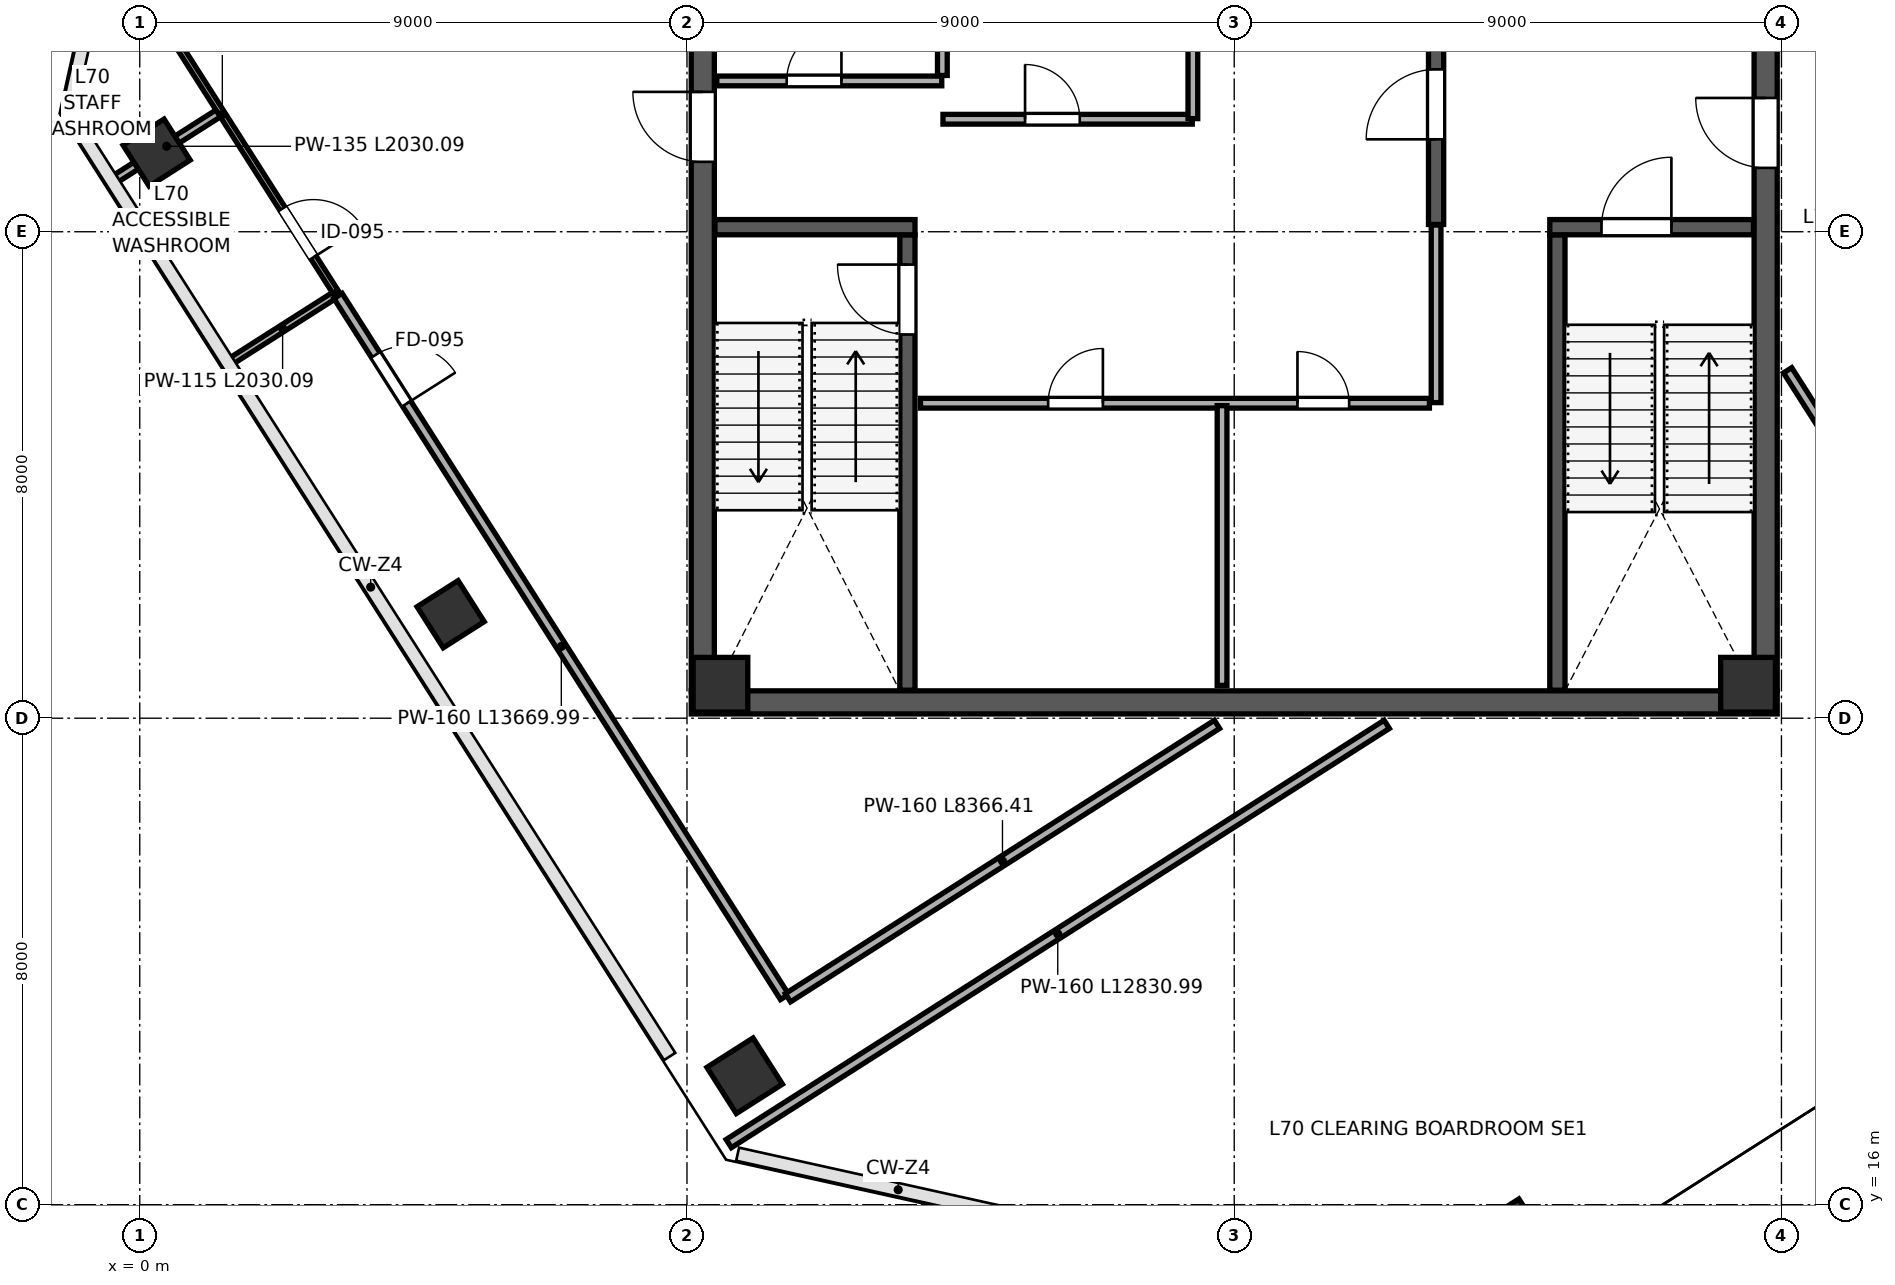
"""IFC4 building model, lengths in metres.
Left out: names, types, materials, properties, quantities, classifications, styles, units other than length and angle.
Written with IfcOpenShell. Run it as: python <this file> out.ifc"""

import sys

from ifc_helpers import new_model, si_unit, direction, frame, frame_2d, origin, origin_2d, place, context, subcontext, project, spatial, rectangle, extrude, source, transform, mapped, element, fill, save


model = new_model("IFC4")
c1 = context("Model", 3, precision=1e-05, world=origin(), true_north=direction((0.0, 1.0)))
c2 = subcontext(c1, "Body", "Model", "MODEL_VIEW")
j1 = project(units=[si_unit("LENGTHUNIT", "METRE"), si_unit("PLANEANGLEUNIT", "RADIAN")], contexts=[c1])
p1 = place(None, origin())
s1 = spatial("IfcSite", under=j1, at=p1, CompositionType="ELEMENT")
p2 = place(p1, origin())
s2 = spatial("IfcBuilding", under=s1, at=p2, CompositionType="ELEMENT")
p3 = place(p2, frame((0.0, 0.0, 311.4)))
s3 = spatial("IfcBuildingStorey", under=s2, at=p3, CompositionType="ELEMENT", Elevation=311.4)
m1 = source(origin(), c2, "Body", "SweptSolid", [
    extrude(rectangle(XDim=0.9, YDim=0.9, at=origin_2d()), origin(), (0.0, 0.0, 1.0), 4.199),
])
for number, where, z_axis, x_axis in (
    (1, (9.55, 24.55, 0.001), (0.0, 0.0, 1.0), (1.0, 0.0, 0.0)),
    (2, (26.45, 24.55, 0.001), (0.0, 0.0, 1.0), (1.0, 0.0, 0.0)),
):
    element("IfcColumn", number, at=place(p3, frame(where, z_axis=z_axis, x_axis=x_axis)), inside=s3, PredefinedType="COLUMN", context=c2, shape_type="MappedRepresentation", body=[
        mapped(m1, transform((0.0, 0.0, 0.0), scale=1.0)),
    ])
m2 = source(origin(), c2, "Body", "SweptSolid", [
    extrude(rectangle(XDim=0.8, YDim=0.8, at=origin_2d()), origin(), (0.0, 0.0, 1.0), 4.199),
])
for number, where, z_axis, x_axis in (
    (3, (0.277, 33.301, 0.001), (0.0, 0.0, 1.0), (-0.537, 0.843, 0.0)),
    (4, (5.113, 25.71, 0.001), (0.0, 0.0, 1.0), (-0.537, 0.843, 0.0)),
):
    element("IfcColumn", number, at=place(p3, frame(where, z_axis=z_axis, x_axis=x_axis)), inside=s3, PredefinedType="COLUMN", context=c2, shape_type="MappedRepresentation", body=[
        mapped(m2, transform((0.0, 0.0, 0.0), scale=1.0)),
    ])
m3 = source(origin(), c2, "Body", "SweptSolid", [
    extrude(rectangle(XDim=0.9, YDim=0.9, at=origin_2d()), origin(), (0.0, 0.0, 1.0), 4.199),
])
for number, where, z_axis, x_axis in (
    (5, (9.949, 18.12, 0.001), (0.0, 0.0, 1.0), (-0.537, 0.843, 0.0)),
    (6, (22.544, 15.472, 0.001), (0.0, 0.0, 1.0), (-0.537, 0.843, 0.0)),
):
    element("IfcColumn", number, at=place(p3, frame(where, z_axis=z_axis, x_axis=x_axis)), inside=s3, PredefinedType="COLUMN", context=c2, shape_type="MappedRepresentation", body=[
        mapped(m3, transform((0.0, 0.0, 0.0), scale=1.0)),
    ])
p4 = place(p3, frame((9.26, 24.45, 0.0), z_axis=(0.0, 0.0, 1.0), x_axis=(0.0, 1.0, 0.0)))
e7 = element("IfcWall", 7, at=p4, inside=s3, PredefinedType="SHEAR", context=c2, shape_type="SweptSolid", body=[
    extrude(rectangle(XDim=15.1, YDim=0.38, at=frame_2d((7.55, 0.0))), origin(), (0.0, 0.0, 1.0), 3.96),
])
p5 = place(p4, frame((8.7, 0.0, 0.0)))
e8 = element("IfcOpeningElement", 8, at=p5, cuts=e7, PredefinedType="OPENING", context=c2, shape_type="SweptSolid", body=[
    extrude(rectangle(XDim=1.15, YDim=2.2, at=frame_2d((0.575, 1.1))), frame((0.0, 0.2, 0.0), z_axis=(0.0, -1.0, 0.0), x_axis=(1.0, 0.0, 0.0)), (0.0, 0.0, 1.0), 0.4),
])
p6 = place(p3, frame((26.74, 24.45, 0.0), z_axis=(0.0, 0.0, 1.0), x_axis=(0.0, 1.0, 0.0)))
e9 = element("IfcWall", 9, at=p6, inside=s3, PredefinedType="SHEAR", context=c2, shape_type="SweptSolid", body=[
    extrude(rectangle(XDim=15.1, YDim=0.38, at=frame_2d((7.55, 0.0))), origin(), (0.0, 0.0, 1.0), 3.96),
])
p7 = place(p6, frame((8.6, 0.0, 0.0)))
e10 = element("IfcOpeningElement", 10, at=p7, cuts=e9, PredefinedType="OPENING", context=c2, shape_type="SweptSolid", body=[
    extrude(rectangle(XDim=1.15, YDim=2.2, at=frame_2d((0.575, 1.1))), frame((0.0, 0.2, 0.0), z_axis=(0.0, -1.0, 0.0), x_axis=(1.0, 0.0, 0.0)), (0.0, 0.0, 1.0), 0.4),
])
p8 = place(p3, frame((9.07, 24.26, 0.0), z_axis=(0.0, 0.0, 1.0), x_axis=(1.0, 0.0, 0.0)))
e11 = element("IfcWall", 11, at=p8, inside=s3, PredefinedType="SHEAR", context=c2, shape_type="SweptSolid", body=[
    extrude(rectangle(XDim=17.86, YDim=0.38, at=frame_2d((8.93, 0.0))), origin(), (0.0, 0.0, 1.0), 3.96),
])
p9 = place(p3, frame((12.625, 24.46, 0.0), z_axis=(0.0, 0.0, 1.0), x_axis=(0.0, 1.0, 0.0)))
e12 = element("IfcWall", 12, at=p9, inside=s3, PredefinedType="SHEAR", context=c2, shape_type="SweptSolid", body=[
    extrude(rectangle(XDim=7.49, YDim=0.25, at=frame_2d((3.745, 0.0))), origin(), (0.0, 0.0, 1.0), 3.96),
])
p10 = place(p9, frame((5.85, 0.0, 0.0)))
e13 = element("IfcOpeningElement", 13, at=p10, cuts=e12, PredefinedType="OPENING", context=c2, shape_type="SweptSolid", body=[
    extrude(rectangle(XDim=1.15, YDim=2.2, at=frame_2d((0.575, 1.1))), frame((0.0, 0.135, 0.0), z_axis=(0.0, -1.0, 0.0), x_axis=(1.0, 0.0, 0.0)), (0.0, 0.0, 1.0), 0.27),
])
p11 = place(p3, frame((9.46, 32.075, 0.0), z_axis=(0.0, 0.0, 1.0), x_axis=(1.0, 0.0, 0.0)))
e14 = element("IfcWall", 14, at=p11, inside=s3, PredefinedType="SHEAR", context=c2, shape_type="SweptSolid", body=[
    extrude(rectangle(XDim=3.29, YDim=0.25, at=frame_2d((1.645, 0.0))), origin(), (0.0, 0.0, 1.0), 3.96),
])
p12 = place(p3, frame((23.315, 24.46, 0.0), z_axis=(0.0, 0.0, 1.0), x_axis=(0.0, 1.0, 0.0)))
e15 = element("IfcWall", 15, at=p12, inside=s3, PredefinedType="SHEAR", context=c2, shape_type="SweptSolid", body=[
    extrude(rectangle(XDim=7.49, YDim=0.25, at=frame_2d((3.745, 0.0))), origin(), (0.0, 0.0, 1.0), 3.96),
])
p13 = place(p3, frame((23.19, 32.075, 0.0), z_axis=(0.0, 0.0, 1.0), x_axis=(1.0, 0.0, 0.0)))
e16 = element("IfcWall", 16, at=p13, inside=s3, PredefinedType="SHEAR", context=c2, shape_type="SweptSolid", body=[
    extrude(rectangle(XDim=3.35, YDim=0.25, at=frame_2d((1.675, 0.0))), origin(), (0.0, 0.0, 1.0), 3.96),
])
p14 = place(p13, frame((0.85, 0.0, 0.0)))
e17 = element("IfcOpeningElement", 17, at=p14, cuts=e16, PredefinedType="OPENING", context=c2, shape_type="SweptSolid", body=[
    extrude(rectangle(XDim=1.15, YDim=2.2, at=frame_2d((0.575, 1.1))), frame((0.0, 0.135, 0.0), z_axis=(0.0, -1.0, 0.0), x_axis=(1.0, 0.0, 0.0)), (0.0, 0.0, 1.0), 0.27),
])
p15 = place(p3, frame((21.32, 32.12, 0.0), z_axis=(0.0, 0.0, 1.0), x_axis=(0.0, 1.0, 0.0)))
e18 = element("IfcWall", 18, at=p15, inside=s3, PredefinedType="SHEAR", context=c2, shape_type="SweptSolid", body=[
    extrude(rectangle(XDim=7.42, YDim=0.25, at=frame_2d((3.71, 0.0))), origin(), (0.0, 0.0, 1.0), 3.96),
])
p16 = place(p15, frame((1.4, 0.0, 0.0)))
e19 = element("IfcOpeningElement", 19, at=p16, cuts=e18, PredefinedType="OPENING", context=c2, shape_type="SweptSolid", body=[
    extrude(rectangle(XDim=1.15, YDim=2.2, at=frame_2d((0.575, 1.1))), frame((0.0, 0.135, 0.0), z_axis=(0.0, -1.0, 0.0), x_axis=(1.0, 0.0, 0.0)), (0.0, 0.0, 1.0), 0.27),
])
p17 = place(p3, frame((9.49, 34.48, 0.0), z_axis=(0.0, 0.0, 1.0), x_axis=(1.0, 0.0, 0.0)))
e20 = element("IfcWall", 20, at=p17, inside=s3, PredefinedType="PARTITIONING", context=c2, shape_type="SweptSolid", body=[
    extrude(rectangle(XDim=3.7, YDim=0.16, at=frame_2d((1.85, 0.0))), origin(), (0.0, 0.0, 1.0), 3.96),
])
p18 = place(p17, frame((1.15, 0.0, 0.0)))
e21 = element("IfcOpeningElement", 21, at=p18, cuts=e20, PredefinedType="OPENING", context=c2, shape_type="SweptSolid", body=[
    extrude(rectangle(XDim=0.9, YDim=2.15, at=frame_2d((0.45, 1.075))), frame((0.0, 0.09, 0.0), z_axis=(0.0, -1.0, 0.0), x_axis=(1.0, 0.0, 0.0)), (0.0, 0.0, 1.0), 0.18),
])
p19 = place(p3, frame((13.2, 34.57, 0.0), z_axis=(0.0, 0.0, 1.0), x_axis=(0.0, 1.0, 0.0)))
e22 = element("IfcWall", 22, at=p19, inside=s3, PredefinedType="PARTITIONING", context=c2, shape_type="SweptSolid", body=[
    extrude(rectangle(XDim=1.57, YDim=0.16, at=frame_2d((0.785, 0.0))), origin(), (0.0, 0.0, 1.0), 3.96),
])
p20 = place(p3, frame((13.21, 33.85, 0.0), z_axis=(0.0, 0.0, 1.0), x_axis=(1.0, 0.0, 0.0)))
e23 = element("IfcWall", 23, at=p20, inside=s3, PredefinedType="PARTITIONING", context=c2, shape_type="SweptSolid", body=[
    extrude(rectangle(XDim=4.1, YDim=0.16, at=frame_2d((2.05, 0.0))), origin(), (0.0, 0.0, 1.0), 3.96),
])
p21 = place(p20, frame((1.35, 0.0, 0.0)))
e24 = element("IfcOpeningElement", 24, at=p21, cuts=e23, PredefinedType="OPENING", context=c2, shape_type="SweptSolid", body=[
    extrude(rectangle(XDim=0.9, YDim=2.15, at=frame_2d((0.45, 1.075))), frame((0.0, 0.09, 0.0), z_axis=(0.0, -1.0, 0.0), x_axis=(1.0, 0.0, 0.0)), (0.0, 0.0, 1.0), 0.18),
])
p22 = place(p3, frame((17.32, 33.86, 0.0), z_axis=(0.0, 0.0, 1.0), x_axis=(0.0, 1.0, 0.0)))
e25 = element("IfcWall", 25, at=p22, inside=s3, PredefinedType="PARTITIONING", context=c2, shape_type="SweptSolid", body=[
    extrude(rectangle(XDim=1.93, YDim=0.16, at=frame_2d((0.965, 0.0))), origin(), (0.0, 0.0, 1.0), 3.96),
])
p23 = place(p3, frame((12.84, 29.18, 0.0), z_axis=(0.0, 0.0, 1.0), x_axis=(1.0, 0.0, 0.0)))
e26 = element("IfcWall", 26, at=p23, inside=s3, PredefinedType="PARTITIONING", context=c2, shape_type="SweptSolid", body=[
    extrude(rectangle(XDim=8.37, YDim=0.16, at=frame_2d((4.185, 0.0))), origin(), (0.0, 0.0, 1.0), 3.96),
])
p24 = place(p23, frame((2.1, 0.0, 0.0)))
e27 = element("IfcOpeningElement", 27, at=p24, cuts=e26, PredefinedType="OPENING", context=c2, shape_type="SweptSolid", body=[
    extrude(rectangle(XDim=0.9, YDim=2.15, at=frame_2d((0.45, 1.075))), frame((0.0, 0.09, 0.0), z_axis=(0.0, -1.0, 0.0), x_axis=(1.0, 0.0, 0.0)), (0.0, 0.0, 1.0), 0.18),
])
p25 = place(p23, frame((6.2, 0.0, 0.0)))
e28 = element("IfcOpeningElement", 28, at=p25, cuts=e26, PredefinedType="OPENING", context=c2, shape_type="SweptSolid", body=[
    extrude(rectangle(XDim=0.85, YDim=2.1, at=frame_2d((0.425, 1.05))), frame((0.0, 0.09, 0.0), z_axis=(0.0, -1.0, 0.0), x_axis=(1.0, 0.0, 0.0)), (0.0, 0.0, 1.0), 0.18),
])
p26 = place(p3, frame((17.8, 24.54, 0.0), z_axis=(0.0, 0.0, 1.0), x_axis=(0.0, 1.0, 0.0)))
e29 = element("IfcWall", 29, at=p26, inside=s3, PredefinedType="PARTITIONING", context=c2, shape_type="SweptSolid", body=[
    extrude(rectangle(XDim=4.6, YDim=0.16, at=frame_2d((2.3, 0.0))), origin(), (0.0, 0.0, 1.0), 3.96),
])
p27 = place(p3, frame((21.32, 29.19, 0.0), z_axis=(0.0, 0.0, 1.0), x_axis=(0.0, 1.0, 0.0)))
e30 = element("IfcWall", 30, at=p27, inside=s3, PredefinedType="PARTITIONING", context=c2, shape_type="SweptSolid", body=[
    extrude(rectangle(XDim=2.92, YDim=0.16, at=frame_2d((1.46, 0.0))), origin(), (0.0, 0.0, 1.0), 3.96),
])
p28 = place(p3, frame((-0.414, 32.86, 0.0), z_axis=(0.0, 0.0, 1.0), x_axis=(0.843468317829, 0.5371789244, 0.0)))
e31 = element("IfcWall", 31, at=p28, inside=s3, PredefinedType="PARTITIONING", context=c2, shape_type="SweptSolid", body=[
    extrude(rectangle(XDim=2.03, YDim=0.135, at=frame_2d((1.015, 0.0))), origin(), (0.0, 0.0, 1.0), 3.295),
])
p29 = place(p3, frame((1.493, 29.866, 0.0), z_axis=(0.0, 0.0, 1.0), x_axis=(0.843433611632, 0.537233415537, 0.0)))
e32 = element("IfcWall", 32, at=p29, inside=s3, PredefinedType="PARTITIONING", context=c2, shape_type="SweptSolid", body=[
    extrude(rectangle(XDim=2.03, YDim=0.115, at=frame_2d((1.015, 0.0))), origin(), (0.0, 0.0, 1.0), 3.295),
])
p30 = place(p3, frame((-0.502, 36.85, 0.0), z_axis=(0.0, 0.0, 1.0), x_axis=(0.537309039539, -0.843385437407, 0.0)))
e33 = element("IfcWall", 33, at=p30, inside=s3, PredefinedType="PARTITIONING", context=c2, shape_type="SweptSolid", body=[
    extrude(rectangle(XDim=6.922, YDim=0.1, at=frame_2d((3.461, 0.0))), origin(), (0.0, 0.0, 1.0), 3.96),
])
p31 = place(p30, frame((0.8, 0.0, 0.0)))
e34 = element("IfcOpeningElement", 34, at=p31, cuts=e33, PredefinedType="OPENING", context=c2, shape_type="SweptSolid", body=[
    extrude(rectangle(XDim=0.9, YDim=2.15, at=frame_2d((0.45, 1.075))), frame((0.0, 0.06, 0.0), z_axis=(0.0, -1.0, 0.0), x_axis=(1.0, 0.0, 0.0)), (0.0, 0.0, 1.0), 0.12),
])
p32 = place(p30, frame((5.3, 0.0, 0.0)))
e35 = element("IfcOpeningElement", 35, at=p32, cuts=e33, PredefinedType="OPENING", context=c2, shape_type="SweptSolid", body=[
    extrude(rectangle(XDim=0.95, YDim=2.15, at=frame_2d((0.475, 1.075))), frame((0.0, 0.06, 0.0), z_axis=(0.0, -1.0, 0.0), x_axis=(1.0, 0.0, 0.0)), (0.0, 0.0, 1.0), 0.12),
])
p33 = place(p3, frame((3.26, 30.945, 0.0), z_axis=(0.0, 0.0, 1.0), x_axis=(0.537307625317, -0.843386338386, 0.0)))
e36 = element("IfcWall", 36, at=p33, inside=s3, PredefinedType="PARTITIONING", context=c2, shape_type="SweptSolid", body=[
    extrude(rectangle(XDim=13.67, YDim=0.16, at=frame_2d((6.835, 0.0))), origin(), (0.0, 0.0, 1.0), 3.96),
])
p34 = place(p33, frame((1.15, 0.0, 0.0)))
e37 = element("IfcOpeningElement", 37, at=p34, cuts=e36, PredefinedType="OPENING", context=c2, shape_type="SweptSolid", body=[
    extrude(rectangle(XDim=0.95, YDim=2.15, at=frame_2d((0.475, 1.075))), frame((0.0, 0.09, 0.0), z_axis=(0.0, -1.0, 0.0), x_axis=(1.0, 0.0, 0.0)), (0.0, 0.0, 1.0), 0.18),
])
p35 = place(p3, frame((10.661, 19.403, 0.0), z_axis=(0.0, 0.0, 1.0), x_axis=(0.843399441764, 0.537287057012, 0.0)))
e38 = element("IfcWall", 38, at=p35, inside=s3, PredefinedType="PARTITIONING", context=c2, shape_type="SweptSolid", body=[
    extrude(rectangle(XDim=8.366, YDim=0.16, at=frame_2d((4.183, 0.0))), origin(), (0.0, 0.0, 1.0), 3.96),
])
p36 = place(p3, frame((27.102, 29.721, 0.0), z_axis=(0.0, 0.0, 1.0), x_axis=(0.537279676557, -0.843404143432, 0.0)))
e39 = element("IfcWall", 39, at=p36, inside=s3, PredefinedType="PARTITIONING", context=c2, shape_type="SweptSolid", body=[
    extrude(rectangle(XDim=1.329, YDim=0.16, at=frame_2d((0.664, 0.0))), origin(), (0.0, 0.0, 1.0), 3.96),
])
p37 = place(p3, frame((22.509, 49.847, 0.0), z_axis=(0.0, 0.0, 1.0), x_axis=(0.537290700932, -0.843397120396, 0.0)))
e40 = element("IfcWall", 40, at=p37, inside=s3, PredefinedType="PARTITIONING", context=c2, shape_type="SweptSolid", body=[
    extrude(rectangle(XDim=20.77, YDim=0.135, at=frame_2d((10.385, 0.0))), origin(), (0.0, 0.0, 1.0), 3.96),
])
p38 = place(p37, frame((4.3, 0.0, 0.0)))
e41 = element("IfcOpeningElement", 41, at=p38, cuts=e40, PredefinedType="OPENING", context=c2, shape_type="SweptSolid", body=[
    extrude(rectangle(XDim=0.95, YDim=2.15, at=frame_2d((0.475, 1.075))), frame((0.0, 0.078, 0.0), z_axis=(0.0, -1.0, 0.0), x_axis=(1.0, 0.0, 0.0)), (0.0, 0.0, 1.0), 0.155),
])
p39 = place(p3, frame((9.687, 17.004, 0.0), z_axis=(0.0, 0.0, 1.0), x_axis=(0.843392646996, 0.537297722862, 0.0)))
e42 = element("IfcWall", 42, at=p39, inside=s3, PredefinedType="PARTITIONING", context=c2, shape_type="SweptSolid", body=[
    extrude(rectangle(XDim=12.831, YDim=0.16, at=frame_2d((6.416, 0.0))), origin(), (0.0, 0.0, 1.0), 3.96),
])
m4 = source(origin(), c2, "Body", "SweptSolid", [
    extrude(rectangle(XDim=1.15, YDim=2.2, at=frame_2d((0.575, 1.1))), frame((0.0, 0.025, 0.0), z_axis=(0.0, -1.0, 0.0), x_axis=(1.0, 0.0, 0.0)), (0.0, 0.0, 1.0), 0.05),
])
p40 = place(p10, origin())
e43 = element("IfcDoor", 43, at=p40, inside=s3, OperationType="SINGLE_SWING_RIGHT", PredefinedType="DOOR", context=c2, shape_type="MappedRepresentation", body=[
    mapped(m4, transform((0.0, 0.0, 0.0), scale=1.0)),
])
fill(e13, e43)
m5 = source(origin(), c2, "Body", "SweptSolid", [
    extrude(rectangle(XDim=1.15, YDim=2.2, at=frame_2d((0.575, 1.1))), frame((0.0, 0.025, 0.0), z_axis=(0.0, -1.0, 0.0), x_axis=(1.0, 0.0, 0.0)), (0.0, 0.0, 1.0), 0.05),
])
p41 = place(p16, origin())
e44 = element("IfcDoor", 44, at=p41, inside=s3, OperationType="SINGLE_SWING_LEFT", PredefinedType="DOOR", context=c2, shape_type="MappedRepresentation", body=[
    mapped(m5, transform((0.0, 0.0, 0.0), scale=1.0)),
])
fill(e19, e44)
p42 = place(p14, origin())
e45 = element("IfcDoor", 45, at=p42, inside=s3, OperationType="SINGLE_SWING_RIGHT", PredefinedType="DOOR", context=c2, shape_type="MappedRepresentation", body=[
    mapped(m4, transform((0.0, 0.0, 0.0), scale=1.0)),
])
fill(e17, e45)
p43 = place(p7, origin())
e46 = element("IfcDoor", 46, at=p43, inside=s3, OperationType="SINGLE_SWING_RIGHT", PredefinedType="DOOR", context=c2, shape_type="MappedRepresentation", body=[
    mapped(m5, transform((0.0, 0.0, 0.0), scale=1.0)),
])
fill(e10, e46)
p44 = place(p5, origin())
e47 = element("IfcDoor", 47, at=p44, inside=s3, OperationType="SINGLE_SWING_RIGHT", PredefinedType="DOOR", context=c2, shape_type="MappedRepresentation", body=[
    mapped(m5, transform((0.0, 0.0, 0.0), scale=1.0)),
])
fill(e8, e47)
m6 = source(origin(), c2, "Body", "SweptSolid", [
    extrude(rectangle(XDim=0.9, YDim=2.15, at=frame_2d((0.45, 1.075))), frame((0.0, 0.025, 0.0), z_axis=(0.0, -1.0, 0.0), x_axis=(1.0, 0.0, 0.0)), (0.0, 0.0, 1.0), 0.05),
])
p45 = place(p18, origin())
e48 = element("IfcDoor", 48, at=p45, inside=s3, OperationType="SINGLE_SWING_RIGHT", PredefinedType="DOOR", context=c2, shape_type="MappedRepresentation", body=[
    mapped(m6, transform((0.0, 0.0, 0.0), scale=1.0)),
])
fill(e21, e48)
p46 = place(p21, origin())
e49 = element("IfcDoor", 49, at=p46, inside=s3, OperationType="SINGLE_SWING_LEFT", PredefinedType="DOOR", context=c2, shape_type="MappedRepresentation", body=[
    mapped(m6, transform((0.0, 0.0, 0.0), scale=1.0)),
])
fill(e24, e49)
p47 = place(p24, origin())
e50 = element("IfcDoor", 50, at=p47, inside=s3, OperationType="SINGLE_SWING_RIGHT", PredefinedType="DOOR", context=c2, shape_type="MappedRepresentation", body=[
    mapped(m6, transform((0.0, 0.0, 0.0), scale=1.0)),
])
fill(e27, e50)
m7 = source(origin(), c2, "Body", "SweptSolid", [
    extrude(rectangle(XDim=0.85, YDim=2.1, at=frame_2d((0.425, 1.05))), frame((0.0, 0.025, 0.0), z_axis=(0.0, -1.0, 0.0), x_axis=(1.0, 0.0, 0.0)), (0.0, 0.0, 1.0), 0.05),
])
p48 = place(p25, origin())
e51 = element("IfcDoor", 51, at=p48, inside=s3, OperationType="SINGLE_SWING_LEFT", PredefinedType="DOOR", context=c2, shape_type="MappedRepresentation", body=[
    mapped(m7, transform((0.0, 0.0, 0.0), scale=1.0)),
])
fill(e28, e51)
m8 = source(origin(), c2, "Body", "SweptSolid", [
    extrude(rectangle(XDim=0.95, YDim=2.15, at=frame_2d((0.475, 1.075))), frame((0.0, 0.025, 0.0), z_axis=(0.0, -1.0, 0.0), x_axis=(1.0, 0.0, 0.0)), (0.0, 0.0, 1.0), 0.05),
])
p49 = place(p32, origin())
e52 = element("IfcDoor", 52, at=p49, inside=s3, OperationType="SINGLE_SWING_RIGHT", PredefinedType="DOOR", context=c2, shape_type="MappedRepresentation", body=[
    mapped(m8, transform((0.0, 0.0, 0.0), scale=1.0)),
])
fill(e35, e52)
m9 = source(origin(), c2, "Body", "SweptSolid", [
    extrude(rectangle(XDim=0.95, YDim=2.15, at=frame_2d((0.475, 1.075))), frame((0.0, 0.025, 0.0), z_axis=(0.0, -1.0, 0.0), x_axis=(1.0, 0.0, 0.0)), (0.0, 0.0, 1.0), 0.05),
])
p50 = place(p34, origin())
e53 = element("IfcDoor", 53, at=p50, inside=s3, OperationType="SINGLE_SWING_RIGHT", PredefinedType="DOOR", context=c2, shape_type="MappedRepresentation", body=[
    mapped(m9, transform((0.0, 0.0, 0.0), scale=1.0)),
])
fill(e37, e53)
save(model, sys.argv[1])
